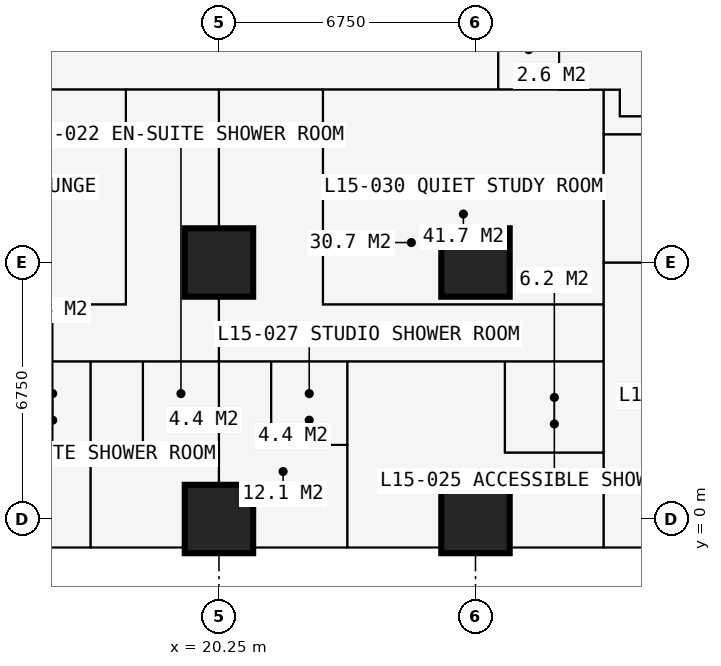
"""IFC4 building model, lengths in metres.
Left out: names, types, materials, properties, quantities, classifications, styles, units other than length and angle.
Written with IfcOpenShell. Run it as: python <this file> out.ifc"""

import sys

from ifc_helpers import new_model, si_unit, direction, frame, frame_2d, origin, origin_2d, place, context, subcontext, project, spatial, rectangle, extrude, element, fill, save


model = new_model("IFC4")
c1 = context("Model", 3, precision=1e-05, world=origin(), true_north=direction((0.0, 1.0)))
c2 = subcontext(c1, "Body", "Model", "MODEL_VIEW")
j1 = project(units=[si_unit("LENGTHUNIT", "METRE"), si_unit("PLANEANGLEUNIT", "RADIAN")], contexts=[c1])
p1 = place(None, origin())
s1 = spatial("IfcSite", under=j1, at=p1, CompositionType="ELEMENT")
p2 = place(p1, origin())
s2 = spatial("IfcBuilding", under=s1, at=p2, CompositionType="ELEMENT")
p3 = place(p2, frame((0.0, 0.0, 57.6)))
s3 = spatial("IfcBuildingStorey", under=s2, at=p3, CompositionType="ELEMENT", Elevation=57.6)
for number, where, z_axis, x_axis in (
    (1, (20.25, 0.0, 0.0), (0.0, 0.0, 1.0), (1.0, 0.0, 0.0)),
    (2, (20.25, 6.75, 0.0), (0.0, 0.0, 1.0), (1.0, 0.0, 0.0)),
    (3, (27.0, 0.0, 0.0), (0.0, 0.0, 1.0), (1.0, 0.0, 0.0)),
    (4, (27.0, 6.75, 0.0), (0.0, 0.0, 1.0), (1.0, 0.0, 0.0)),
):
    element("IfcColumn", number, at=place(p3, frame(where, z_axis=z_axis, x_axis=x_axis)), inside=s3, PredefinedType="COLUMN", context=c2, shape_type="SweptSolid", body=[
        extrude(rectangle(XDim=1.8, YDim=1.8, at=origin_2d()), origin(), (0.0, 0.0, 1.0), 3.6),
    ])
p4 = place(p3, frame((27.0, -0.75, 0.0), z_axis=(0.0, 0.0, 1.0), x_axis=(-1.0, 0.0, 0.0)))
e5 = element("IfcWall", 5, at=p4, inside=s3, PredefinedType="SOLIDWALL", context=c2, shape_type="SweptSolid", body=[
    extrude(rectangle(XDim=6.75, YDim=0.15, at=frame_2d((3.375, 0.0))), origin(), (0.0, 0.0, 1.0), 3.375),
])
p5 = place(p4, frame((0.962, 0.0, 0.0)))
e6 = element("IfcOpeningElement", 6, at=p5, cuts=e5, PredefinedType="OPENING", context=c2, shape_type="SweptSolid", body=[
    extrude(rectangle(XDim=1.0, YDim=2.2, at=frame_2d((0.5, 1.1))), frame((0.0, 0.085, 0.0), z_axis=(0.0, -1.0, 0.0), x_axis=(1.0, 0.0, 0.0)), (0.0, 0.0, 1.0), 0.17),
])
p6 = place(p4, frame((2.025, 0.0, 0.9)))
e7 = element("IfcOpeningElement", 7, at=p6, cuts=e5, PredefinedType="OPENING", context=c2, shape_type="SweptSolid", body=[
    extrude(rectangle(XDim=1.2, YDim=1.8, at=frame_2d((0.6, 0.9))), frame((0.0, 0.085, 0.0), z_axis=(0.0, -1.0, 0.0), x_axis=(1.0, 0.0, 0.0)), (0.0, 0.0, 1.0), 0.17),
])
p7 = place(p4, frame((4.788, 0.0, 0.0)))
e8 = element("IfcOpeningElement", 8, at=p7, cuts=e5, PredefinedType="OPENING", context=c2, shape_type="SweptSolid", body=[
    extrude(rectangle(XDim=1.0, YDim=2.2, at=frame_2d((0.5, 1.1))), frame((0.0, 0.085, 0.0), z_axis=(0.0, -1.0, 0.0), x_axis=(1.0, 0.0, 0.0)), (0.0, 0.0, 1.0), 0.17),
])
p8 = place(p4, frame((3.525, 0.0, 0.9)))
e9 = element("IfcOpeningElement", 9, at=p8, cuts=e5, PredefinedType="OPENING", context=c2, shape_type="SweptSolid", body=[
    extrude(rectangle(XDim=1.2, YDim=1.8, at=frame_2d((0.6, 0.9))), frame((0.0, 0.085, 0.0), z_axis=(0.0, -1.0, 0.0), x_axis=(1.0, 0.0, 0.0)), (0.0, 0.0, 1.0), 0.17),
])
p9 = place(p3, frame((23.625, -0.85, 0.0), z_axis=(0.0, 0.0, 1.0), x_axis=(0.0, -1.0, 0.0)))
e10 = element("IfcWall", 10, at=p9, inside=s3, PredefinedType="USERDEFINED", context=c2, shape_type="SweptSolid", body=[
    extrude(rectangle(XDim=2.2, YDim=1.0, at=frame_2d((1.1, 0.0))), origin(), (0.0, 0.0, 1.0), 0.9),
])
p10 = place(p3, frame((6.75, 4.15, 0.0), z_axis=(0.0, 0.0, 1.0), x_axis=(1.0, 0.0, 0.0)))
e11 = element("IfcWall", 11, at=p10, inside=s3, PredefinedType="PARTITIONING", context=c2, shape_type="SweptSolid", body=[
    extrude(rectangle(XDim=23.625, YDim=0.1, at=frame_2d((11.812, 0.0))), origin(), (0.0, 0.0, 1.0), 3.375),
])
p11 = place(p10, frame((2.85, 0.0, 0.0)))
e12 = element("IfcOpeningElement", 12, at=p11, cuts=e11, PredefinedType="OPENING", context=c2, shape_type="SweptSolid", body=[
    extrude(rectangle(XDim=1.0, YDim=2.2, at=frame_2d((0.5, 1.1))), frame((0.0, 0.06, 0.0), z_axis=(0.0, -1.0, 0.0), x_axis=(1.0, 0.0, 0.0)), (0.0, 0.0, 1.0), 0.12),
])
p12 = place(p10, frame((6.95, 0.0, 0.0)))
e13 = element("IfcOpeningElement", 13, at=p12, cuts=e11, PredefinedType="OPENING", context=c2, shape_type="SweptSolid", body=[
    extrude(rectangle(XDim=0.95, YDim=2.2, at=frame_2d((0.475, 1.1))), frame((0.0, 0.06, 0.0), z_axis=(0.0, -1.0, 0.0), x_axis=(1.0, 0.0, 0.0)), (0.0, 0.0, 1.0), 0.12),
])
p13 = place(p10, frame((10.375, 0.0, 0.0)))
e14 = element("IfcOpeningElement", 14, at=p13, cuts=e11, PredefinedType="OPENING", context=c2, shape_type="SweptSolid", body=[
    extrude(rectangle(XDim=0.95, YDim=2.2, at=frame_2d((0.475, 1.1))), frame((0.0, 0.06, 0.0), z_axis=(0.0, -1.0, 0.0), x_axis=(1.0, 0.0, 0.0)), (0.0, 0.0, 1.0), 0.12),
])
p14 = place(p10, frame((18.475, 0.0, 0.0)))
e15 = element("IfcOpeningElement", 15, at=p14, cuts=e11, PredefinedType="OPENING", context=c2, shape_type="SweptSolid", body=[
    extrude(rectangle(XDim=0.95, YDim=2.2, at=frame_2d((0.475, 1.1))), frame((0.0, 0.06, 0.0), z_axis=(0.0, -1.0, 0.0), x_axis=(1.0, 0.0, 0.0)), (0.0, 0.0, 1.0), 0.12),
])
p15 = place(p10, frame((13.7, 0.0, 0.0)))
e16 = element("IfcOpeningElement", 16, at=p15, cuts=e11, PredefinedType="OPENING", context=c2, shape_type="SweptSolid", body=[
    extrude(rectangle(XDim=0.95, YDim=2.2, at=frame_2d((0.475, 1.1))), frame((0.0, 0.06, 0.0), z_axis=(0.0, -1.0, 0.0), x_axis=(1.0, 0.0, 0.0)), (0.0, 0.0, 1.0), 0.12),
])
p16 = place(p3, frame((6.75, 5.65, 0.0), z_axis=(0.0, 0.0, 1.0), x_axis=(1.0, 0.0, 0.0)))
e17 = element("IfcWall", 17, at=p16, inside=s3, PredefinedType="PARTITIONING", context=c2, shape_type="SweptSolid", body=[
    extrude(rectangle(XDim=11.05, YDim=0.15, at=frame_2d((5.525, 0.0))), origin(), (0.0, 0.0, 1.0), 3.375),
])
p17 = place(p3, frame((10.125, 11.3, 0.0), z_axis=(0.0, 0.0, 1.0), x_axis=(1.0, 0.0, 0.0)))
e18 = element("IfcWall", 18, at=p17, inside=s3, PredefinedType="PARTITIONING", context=c2, shape_type="SweptSolid", body=[
    extrude(rectangle(XDim=20.675, YDim=0.15, at=frame_2d((10.337, 0.0))), origin(), (0.0, 0.0, 1.0), 3.375),
])
p18 = place(p17, frame((8.375, 0.0, 0.0)))
e19 = element("IfcOpeningElement", 19, at=p18, cuts=e18, PredefinedType="OPENING", context=c2, shape_type="SweptSolid", body=[
    extrude(rectangle(XDim=1.0, YDim=2.2, at=frame_2d((0.5, 1.1))), frame((0.0, 0.085, 0.0), z_axis=(0.0, -1.0, 0.0), x_axis=(1.0, 0.0, 0.0)), (0.0, 0.0, 1.0), 0.17),
])
p19 = place(p17, frame((10.975, 0.0, 0.0)))
e20 = element("IfcOpeningElement", 20, at=p19, cuts=e18, PredefinedType="OPENING", context=c2, shape_type="SweptSolid", body=[
    extrude(rectangle(XDim=1.0, YDim=2.2, at=frame_2d((0.5, 1.1))), frame((0.0, 0.085, 0.0), z_axis=(0.0, -1.0, 0.0), x_axis=(1.0, 0.0, 0.0)), (0.0, 0.0, 1.0), 0.17),
])
p20 = place(p17, frame((3.925, 0.0, 0.0)))
e21 = element("IfcOpeningElement", 21, at=p20, cuts=e18, PredefinedType="OPENING", context=c2, shape_type="SweptSolid", body=[
    extrude(rectangle(XDim=0.95, YDim=2.2, at=frame_2d((0.475, 1.1))), frame((0.0, 0.085, 0.0), z_axis=(0.0, -1.0, 0.0), x_axis=(1.0, 0.0, 0.0)), (0.0, 0.0, 1.0), 0.17),
])
p21 = place(p3, frame((14.875, 1.95, 0.0), z_axis=(0.0, 0.0, 1.0), x_axis=(1.0, 0.0, 0.0)))
e22 = element("IfcWall", 22, at=p21, inside=s3, PredefinedType="PARTITIONING", context=c2, shape_type="SweptSolid", body=[
    extrude(rectangle(XDim=2.0, YDim=0.1, at=frame_2d((1.0, 0.0))), origin(), (0.0, 0.0, 1.0), 3.375),
])
p22 = place(p3, frame((16.875, -0.734, 0.0), z_axis=(0.0, 0.0, 1.0), x_axis=(0.0, 1.0, 0.0)))
e23 = element("IfcWall", 23, at=p22, inside=s3, PredefinedType="PARTITIONING", context=c2, shape_type="SweptSolid", body=[
    extrude(rectangle(XDim=4.884, YDim=0.175, at=frame_2d((2.442, 0.0))), origin(), (0.0, 0.0, 1.0), 3.375),
])
p23 = place(p3, frame((17.8, 5.65, 0.0), z_axis=(0.0, 0.0, 1.0), x_axis=(0.0, 1.0, 0.0)))
e24 = element("IfcWall", 24, at=p23, inside=s3, PredefinedType="PARTITIONING", context=c2, shape_type="SweptSolid", body=[
    extrude(rectangle(XDim=5.65, YDim=0.15, at=frame_2d((2.825, 0.0))), origin(), (0.0, 0.0, 1.0), 3.375),
])
p24 = place(p3, frame((18.25, 1.95, 0.0), z_axis=(0.0, 0.0, 1.0), x_axis=(0.0, 1.0, 0.0)))
e25 = element("IfcWall", 25, at=p24, inside=s3, PredefinedType="PARTITIONING", context=c2, shape_type="SweptSolid", body=[
    extrude(rectangle(XDim=2.2, YDim=0.1, at=frame_2d((1.1, 0.0))), origin(), (0.0, 0.0, 1.0), 3.375),
])
p25 = place(p24, frame((0.65, 0.0, 0.0)))
e26 = element("IfcOpeningElement", 26, at=p25, cuts=e25, PredefinedType="OPENING", context=c2, shape_type="SweptSolid", body=[
    extrude(rectangle(XDim=0.9, YDim=2.2, at=frame_2d((0.45, 1.1))), frame((0.0, 0.06, 0.0), z_axis=(0.0, -1.0, 0.0), x_axis=(1.0, 0.0, 0.0)), (0.0, 0.0, 1.0), 0.12),
])
p26 = place(p3, frame((18.25, 1.95, 0.0), z_axis=(0.0, 0.0, 1.0), x_axis=(1.0, 0.0, 0.0)))
e27 = element("IfcWall", 27, at=p26, inside=s3, PredefinedType="PARTITIONING", context=c2, shape_type="SweptSolid", body=[
    extrude(rectangle(XDim=2.0, YDim=0.1, at=frame_2d((1.0, 0.0))), origin(), (0.0, 0.0, 1.0), 3.375),
])
p27 = place(p3, frame((20.25, -0.734, 0.0), z_axis=(0.0, 0.0, 1.0), x_axis=(0.0, 1.0, 0.0)))
e28 = element("IfcWall", 28, at=p27, inside=s3, PredefinedType="PARTITIONING", context=c2, shape_type="SweptSolid", body=[
    extrude(rectangle(XDim=12.034, YDim=0.15, at=frame_2d((6.017, 0.0))), origin(), (0.0, 0.0, 1.0), 2.61),
])
p28 = place(p3, frame((21.625, 1.95, 0.0), z_axis=(0.0, 0.0, 1.0), x_axis=(0.0, 1.0, 0.0)))
e29 = element("IfcWall", 29, at=p28, inside=s3, PredefinedType="PARTITIONING", context=c2, shape_type="SweptSolid", body=[
    extrude(rectangle(XDim=2.2, YDim=0.1, at=frame_2d((1.1, 0.0))), origin(), (0.0, 0.0, 1.0), 3.375),
])
p29 = place(p3, frame((21.625, 1.95, 0.0), z_axis=(0.0, 0.0, 1.0), x_axis=(1.0, 0.0, 0.0)))
e30 = element("IfcWall", 30, at=p29, inside=s3, PredefinedType="PARTITIONING", context=c2, shape_type="SweptSolid", body=[
    extrude(rectangle(XDim=2.0, YDim=0.1, at=frame_2d((1.0, 0.0))), origin(), (0.0, 0.0, 1.0), 3.375),
])
p30 = place(p3, frame((22.988, 5.65, 0.0), z_axis=(0.0, 0.0, 1.0), x_axis=(1.0, 0.0, 0.0)))
e31 = element("IfcWall", 31, at=p30, inside=s3, PredefinedType="PARTITIONING", context=c2, shape_type="SweptSolid", body=[
    extrude(rectangle(XDim=7.387, YDim=0.15, at=frame_2d((3.694, 0.0))), origin(), (0.0, 0.0, 1.0), 3.375),
])
p31 = place(p30, frame((2.15, 0.0, 0.0)))
e32 = element("IfcOpeningElement", 32, at=p31, cuts=e31, PredefinedType="OPENING", context=c2, shape_type="SweptSolid", body=[
    extrude(rectangle(XDim=0.95, YDim=2.2, at=frame_2d((0.475, 1.1))), frame((0.0, 0.085, 0.0), z_axis=(0.0, -1.0, 0.0), x_axis=(1.0, 0.0, 0.0)), (0.0, 0.0, 1.0), 0.17),
])
p32 = place(p3, frame((22.988, 5.65, 0.0), z_axis=(0.0, 0.0, 1.0), x_axis=(0.0, 1.0, 0.0)))
e33 = element("IfcWall", 33, at=p32, inside=s3, PredefinedType="PARTITIONING", context=c2, shape_type="SweptSolid", body=[
    extrude(rectangle(XDim=5.65, YDim=0.15, at=frame_2d((2.825, 0.0))), origin(), (0.0, 0.0, 1.0), 3.375),
])
p33 = place(p3, frame((23.625, -0.734, 0.0), z_axis=(0.0, 0.0, 1.0), x_axis=(0.0, 1.0, 0.0)))
e34 = element("IfcWall", 34, at=p33, inside=s3, PredefinedType="PARTITIONING", context=c2, shape_type="SweptSolid", body=[
    extrude(rectangle(XDim=4.884, YDim=0.175, at=frame_2d((2.442, 0.0))), origin(), (0.0, 0.0, 1.0), 3.375),
])
p34 = place(p33, frame((3.334, 0.0, 0.0)))
e35 = element("IfcOpeningElement", 35, at=p34, cuts=e34, PredefinedType="OPENING", context=c2, shape_type="SweptSolid", body=[
    extrude(rectangle(XDim=0.9, YDim=2.2, at=frame_2d((0.45, 1.1))), frame((0.0, 0.097, 0.0), z_axis=(0.0, -1.0, 0.0), x_axis=(1.0, 0.0, 0.0)), (0.0, 0.0, 1.0), 0.195),
])
p35 = place(p3, frame((27.6, 11.3, 0.0), z_axis=(0.0, 0.0, 1.0), x_axis=(0.0, 1.0, 0.0)))
e36 = element("IfcWall", 36, at=p35, inside=s3, PredefinedType="PARTITIONING", context=c2, shape_type="SweptSolid", body=[
    extrude(rectangle(XDim=1.6, YDim=0.15, at=frame_2d((0.8, 0.0))), origin(), (0.0, 0.0, 1.0), 3.375),
])
p36 = place(p35, frame((0.3, 0.0, 0.0)))
e37 = element("IfcOpeningElement", 37, at=p36, cuts=e36, PredefinedType="OPENING", context=c2, shape_type="SweptSolid", body=[
    extrude(rectangle(XDim=0.95, YDim=2.2, at=frame_2d((0.475, 1.1))), frame((0.0, 0.085, 0.0), z_axis=(0.0, -1.0, 0.0), x_axis=(1.0, 0.0, 0.0)), (0.0, 0.0, 1.0), 0.17),
])
p37 = place(p3, frame((27.775, 1.75, 0.0), z_axis=(0.0, 0.0, 1.0), x_axis=(0.0, 1.0, 0.0)))
e38 = element("IfcWall", 38, at=p37, inside=s3, PredefinedType="PARTITIONING", context=c2, shape_type="SweptSolid", body=[
    extrude(rectangle(XDim=2.4, YDim=0.1, at=frame_2d((1.2, 0.0))), origin(), (0.0, 0.0, 1.0), 3.375),
])
p38 = place(p3, frame((27.775, 1.75, 0.0), z_axis=(0.0, 0.0, 1.0), x_axis=(1.0, 0.0, 0.0)))
e39 = element("IfcWall", 39, at=p38, inside=s3, PredefinedType="PARTITIONING", context=c2, shape_type="SweptSolid", body=[
    extrude(rectangle(XDim=2.6, YDim=0.1, at=frame_2d((1.3, 0.0))), origin(), (0.0, 0.0, 1.0), 3.375),
])
p39 = place(p38, frame((0.85, 0.0, 0.0)))
e40 = element("IfcOpeningElement", 40, at=p39, cuts=e39, PredefinedType="OPENING", context=c2, shape_type="SweptSolid", body=[
    extrude(rectangle(XDim=0.9, YDim=2.2, at=frame_2d((0.45, 1.1))), frame((0.0, 0.06, 0.0), z_axis=(0.0, -1.0, 0.0), x_axis=(1.0, 0.0, 0.0)), (0.0, 0.0, 1.0), 0.12),
])
p40 = place(p3, frame((29.2, 11.3, 0.0), z_axis=(0.0, 0.0, 1.0), x_axis=(0.0, 1.0, 0.0)))
e41 = element("IfcWall", 41, at=p40, inside=s3, PredefinedType="PARTITIONING", context=c2, shape_type="SweptSolid", body=[
    extrude(rectangle(XDim=17.9, YDim=0.2, at=frame_2d((8.95, 0.0))), origin(), (0.0, 0.0, 1.0), 3.375),
])
p41 = place(p40, frame((8.35, 0.0, 0.0)))
e42 = element("IfcOpeningElement", 42, at=p41, cuts=e41, PredefinedType="OPENING", context=c2, shape_type="SweptSolid", body=[
    extrude(rectangle(XDim=1.2, YDim=2.2, at=frame_2d((0.6, 1.1))), frame((0.0, 0.11, 0.0), z_axis=(0.0, -1.0, 0.0), x_axis=(1.0, 0.0, 0.0)), (0.0, 0.0, 1.0), 0.22),
])
p42 = place(p3, frame((30.375, -0.734, 0.0), z_axis=(0.0, 0.0, 1.0), x_axis=(0.0, 1.0, 0.0)))
e43 = element("IfcWall", 43, at=p42, inside=s3, PredefinedType="PARTITIONING", context=c2, shape_type="SweptSolid", body=[
    extrude(rectangle(XDim=12.034, YDim=0.15, at=frame_2d((6.017, 0.0))), origin(), (0.0, 0.0, 1.0), 3.375),
])
p43 = place(p3, frame((30.375, 6.75, 0.0), z_axis=(0.0, 0.0, 1.0), x_axis=(1.0, 0.0, 0.0)))
e44 = element("IfcWall", 44, at=p43, inside=s3, PredefinedType="PARTITIONING", context=c2, shape_type="SweptSolid", body=[
    extrude(rectangle(XDim=10.859, YDim=0.15, at=frame_2d((5.429, 0.0))), origin(), (0.0, 0.0, 1.0), 2.877),
])
p44 = place(p43, frame((1.45, 0.0, 0.0)))
e45 = element("IfcOpeningElement", 45, at=p44, cuts=e44, PredefinedType="OPENING", context=c2, shape_type="SweptSolid", body=[
    extrude(rectangle(XDim=1.0, YDim=2.2, at=frame_2d((0.5, 1.1))), frame((0.0, 0.085, 0.0), z_axis=(0.0, -1.0, 0.0), x_axis=(1.0, 0.0, 0.0)), (0.0, 0.0, 1.0), 0.17),
])
p45 = place(p3, frame((30.375, 10.125, 0.0), z_axis=(0.0, 0.0, 1.0), x_axis=(1.0, 0.0, 0.0)))
e46 = element("IfcWall", 46, at=p45, inside=s3, PredefinedType="PARTITIONING", context=c2, shape_type="SweptSolid", body=[
    extrude(rectangle(XDim=10.859, YDim=0.15, at=frame_2d((5.429, 0.0))), origin(), (0.0, 0.0, 1.0), 3.375),
])
p46 = place(p45, frame((2.5, 0.0, 0.0)))
e47 = element("IfcOpeningElement", 47, at=p46, cuts=e46, PredefinedType="OPENING", context=c2, shape_type="SweptSolid", body=[
    extrude(rectangle(XDim=1.0, YDim=2.2, at=frame_2d((0.5, 1.1))), frame((0.0, 0.085, 0.0), z_axis=(0.0, -1.0, 0.0), x_axis=(1.0, 0.0, 0.0)), (0.0, 0.0, 1.0), 0.17),
])
p47 = place(p3, frame((30.8, 10.6, 0.0), z_axis=(0.0, 0.0, 1.0), x_axis=(0.0, 1.0, 0.0)))
e48 = element("IfcWall", 48, at=p47, inside=s3, PredefinedType="PARTITIONING", context=c2, shape_type="SweptSolid", body=[
    extrude(rectangle(XDim=0.7, YDim=0.15, at=frame_2d((0.35, 0.0))), origin(), (0.0, 0.0, 1.0), 3.375),
])
p48 = place(p3, frame((30.8, 10.6, 0.0), z_axis=(0.0, 0.0, 1.0), x_axis=(1.0, 0.0, 0.0)))
e49 = element("IfcWall", 49, at=p48, inside=s3, PredefinedType="PARTITIONING", context=c2, shape_type="SweptSolid", body=[
    extrude(rectangle(XDim=1.85, YDim=0.15, at=frame_2d((0.925, 0.0))), origin(), (0.0, 0.0, 1.0), 3.375),
])
p49 = place(p5, origin())
e50 = element("IfcDoor", 50, at=p49, inside=s3, OperationType="SINGLE_SWING_LEFT", PredefinedType="DOOR", context=c2, shape_type="SweptSolid", body=[
    extrude(rectangle(XDim=1.0, YDim=2.2, at=frame_2d((0.5, 1.1))), frame((0.0, 0.025, 0.0), z_axis=(0.0, -1.0, 0.0), x_axis=(1.0, 0.0, 0.0)), (0.0, 0.0, 1.0), 0.05),
])
fill(e6, e50)
p50 = place(p6, origin())
e51 = element("IfcWindow", 51, at=p50, inside=s3, PartitioningType="SINGLE_PANEL", PredefinedType="WINDOW", context=c2, shape_type="SweptSolid", body=[
    extrude(rectangle(XDim=1.2, YDim=1.8, at=frame_2d((0.6, 0.9))), frame((0.0, 0.03, 0.0), z_axis=(0.0, -1.0, 0.0), x_axis=(1.0, 0.0, 0.0)), (0.0, 0.0, 1.0), 0.06),
])
fill(e7, e51)
p51 = place(p7, origin())
e52 = element("IfcDoor", 52, at=p51, inside=s3, OperationType="SINGLE_SWING_RIGHT", PredefinedType="DOOR", context=c2, shape_type="SweptSolid", body=[
    extrude(rectangle(XDim=1.0, YDim=2.2, at=frame_2d((0.5, 1.1))), frame((0.0, 0.025, 0.0), z_axis=(0.0, -1.0, 0.0), x_axis=(1.0, 0.0, 0.0)), (0.0, 0.0, 1.0), 0.05),
])
fill(e8, e52)
p52 = place(p8, origin())
e53 = element("IfcWindow", 53, at=p52, inside=s3, PartitioningType="SINGLE_PANEL", PredefinedType="WINDOW", context=c2, shape_type="SweptSolid", body=[
    extrude(rectangle(XDim=1.2, YDim=1.8, at=frame_2d((0.6, 0.9))), frame((0.0, 0.03, 0.0), z_axis=(0.0, -1.0, 0.0), x_axis=(1.0, 0.0, 0.0)), (0.0, 0.0, 1.0), 0.06),
])
fill(e9, e53)
p53 = place(p36, origin())
e54 = element("IfcDoor", 54, at=p53, inside=s3, OperationType="SINGLE_SWING_LEFT", PredefinedType="DOOR", context=c2, shape_type="SweptSolid", body=[
    extrude(rectangle(XDim=0.95, YDim=2.2, at=frame_2d((0.475, 1.1))), frame((0.0, 0.025, 0.0), z_axis=(0.0, -1.0, 0.0), x_axis=(1.0, 0.0, 0.0)), (0.0, 0.0, 1.0), 0.05),
])
fill(e37, e54)
p54 = place(p13, origin())
e55 = element("IfcDoor", 55, at=p54, inside=s3, OperationType="SINGLE_SWING_LEFT", PredefinedType="DOOR", context=c2, shape_type="SweptSolid", body=[
    extrude(rectangle(XDim=0.95, YDim=2.2, at=frame_2d((0.475, 1.1))), frame((0.0, 0.025, 0.0), z_axis=(0.0, -1.0, 0.0), x_axis=(1.0, 0.0, 0.0)), (0.0, 0.0, 1.0), 0.05),
])
fill(e14, e55)
p55 = place(p25, origin())
e56 = element("IfcDoor", 56, at=p55, inside=s3, OperationType="SINGLE_SWING_RIGHT", PredefinedType="DOOR", context=c2, shape_type="SweptSolid", body=[
    extrude(rectangle(XDim=0.9, YDim=2.2, at=frame_2d((0.45, 1.1))), frame((0.0, 0.025, 0.0), z_axis=(0.0, -1.0, 0.0), x_axis=(1.0, 0.0, 0.0)), (0.0, 0.0, 1.0), 0.05),
])
fill(e26, e56)
p56 = place(p18, origin())
e57 = element("IfcDoor", 57, at=p56, inside=s3, OperationType="SINGLE_SWING_LEFT", PredefinedType="DOOR", context=c2, shape_type="SweptSolid", body=[
    extrude(rectangle(XDim=1.0, YDim=2.2, at=frame_2d((0.5, 1.1))), frame((0.0, 0.025, 0.0), z_axis=(0.0, -1.0, 0.0), x_axis=(1.0, 0.0, 0.0)), (0.0, 0.0, 1.0), 0.05),
])
fill(e19, e57)
p57 = place(p14, origin())
e58 = element("IfcDoor", 58, at=p57, inside=s3, OperationType="SINGLE_SWING_LEFT", PredefinedType="DOOR", context=c2, shape_type="SweptSolid", body=[
    extrude(rectangle(XDim=0.95, YDim=2.2, at=frame_2d((0.475, 1.1))), frame((0.0, 0.025, 0.0), z_axis=(0.0, -1.0, 0.0), x_axis=(1.0, 0.0, 0.0)), (0.0, 0.0, 1.0), 0.05),
])
fill(e15, e58)
p58 = place(p39, origin())
e59 = element("IfcDoor", 59, at=p58, inside=s3, OperationType="SINGLE_SWING_RIGHT", PredefinedType="DOOR", context=c2, shape_type="SweptSolid", body=[
    extrude(rectangle(XDim=0.9, YDim=2.2, at=frame_2d((0.45, 1.1))), frame((0.0, 0.025, 0.0), z_axis=(0.0, -1.0, 0.0), x_axis=(1.0, 0.0, 0.0)), (0.0, 0.0, 1.0), 0.05),
])
fill(e40, e59)
p59 = place(p15, origin())
e60 = element("IfcDoor", 60, at=p59, inside=s3, OperationType="SINGLE_SWING_LEFT", PredefinedType="DOOR", context=c2, shape_type="SweptSolid", body=[
    extrude(rectangle(XDim=0.95, YDim=2.2, at=frame_2d((0.475, 1.1))), frame((0.0, 0.025, 0.0), z_axis=(0.0, -1.0, 0.0), x_axis=(1.0, 0.0, 0.0)), (0.0, 0.0, 1.0), 0.05),
])
fill(e16, e60)
p60 = place(p34, origin())
e61 = element("IfcDoor", 61, at=p60, inside=s3, OperationType="SINGLE_SWING_RIGHT", PredefinedType="DOOR", context=c2, shape_type="SweptSolid", body=[
    extrude(rectangle(XDim=0.9, YDim=2.2, at=frame_2d((0.45, 1.1))), frame((0.0, 0.025, 0.0), z_axis=(0.0, -1.0, 0.0), x_axis=(1.0, 0.0, 0.0)), (0.0, 0.0, 1.0), 0.05),
])
fill(e35, e61)
p61 = place(p19, origin())
e62 = element("IfcDoor", 62, at=p61, inside=s3, OperationType="SINGLE_SWING_LEFT", PredefinedType="DOOR", context=c2, shape_type="SweptSolid", body=[
    extrude(rectangle(XDim=1.0, YDim=2.2, at=frame_2d((0.5, 1.1))), frame((0.0, 0.025, 0.0), z_axis=(0.0, -1.0, 0.0), x_axis=(1.0, 0.0, 0.0)), (0.0, 0.0, 1.0), 0.05),
])
fill(e20, e62)
p62 = place(p31, origin())
e63 = element("IfcDoor", 63, at=p62, inside=s3, OperationType="SINGLE_SWING_LEFT", PredefinedType="DOOR", context=c2, shape_type="SweptSolid", body=[
    extrude(rectangle(XDim=0.95, YDim=2.2, at=frame_2d((0.475, 1.1))), frame((0.0, 0.025, 0.0), z_axis=(0.0, -1.0, 0.0), x_axis=(1.0, 0.0, 0.0)), (0.0, 0.0, 1.0), 0.05),
])
fill(e32, e63)
save(model, sys.argv[1])
